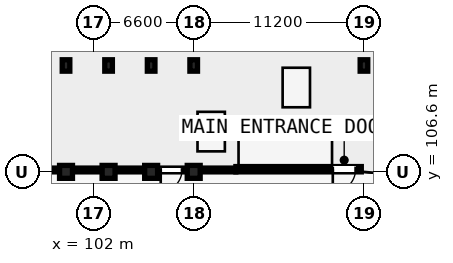
"""IFC4 building model, lengths in metres.
Left out: names, types, materials, properties, quantities, classifications, styles, units other than length and angle.
Written with IfcOpenShell. Run it as: python <this file> out.ifc"""

import sys

from ifc_helpers import new_model, si_unit, direction, frame, frame_2d, origin, origin_2d, place, context, subcontext, project, spatial, rectangle, extrude, element, fill, save


model = new_model("IFC4")
c1 = context("Model", 3, precision=1e-05, world=origin(), true_north=direction((0.0, 1.0)))
c2 = subcontext(c1, "Body", "Model", "MODEL_VIEW")
j1 = project(units=[si_unit("LENGTHUNIT", "METRE"), si_unit("PLANEANGLEUNIT", "RADIAN")], contexts=[c1])
p1 = place(None, origin())
s1 = spatial("IfcSite", under=j1, at=p1, CompositionType="ELEMENT")
p2 = place(p1, origin())
s2 = spatial("IfcBuilding", under=s1, at=p2, CompositionType="ELEMENT")
p3 = place(p2, origin())
s3 = spatial("IfcBuildingStorey", under=s2, at=p3, CompositionType="ELEMENT", Elevation=0.0)
p4 = place(p3, frame((119.625, 106.775, 0.0), z_axis=(0.0, 0.0, 1.0), x_axis=(-1.0, 0.0, 0.0)))
e1 = element("IfcWall", 1, at=p4, inside=s3, PredefinedType="SHEAR", context=c2, shape_type="SweptSolid", body=[
    extrude(rectangle(XDim=8.25, YDim=0.35, at=frame_2d((4.125, 0.0))), origin(), (0.0, 0.0, 1.0), 4.15),
])
p5 = place(p4, frame((0.375, 0.0, 0.0)))
e2 = element("IfcOpeningElement", 2, at=p5, cuts=e1, PredefinedType="OPENING", context=c2, shape_type="SweptSolid", body=[
    extrude(rectangle(XDim=1.5, YDim=2.15, at=frame_2d((0.75, 1.075))), frame((0.0, 0.185, 0.0), z_axis=(0.0, -1.0, 0.0), x_axis=(1.0, 0.0, 0.0)), (0.0, 0.0, 1.0), 0.37),
])
p6 = place(p3, frame((119.45, 110.225, 0.0), z_axis=(0.0, 0.0, 1.0), x_axis=(-1.0, 0.0, 0.0)))
e3 = element("IfcWall", 3, at=p6, inside=s3, PredefinedType="SHEAR", context=c2, shape_type="SweptSolid", body=[
    extrude(rectangle(XDim=7.9, YDim=0.35, at=frame_2d((3.95, 0.0))), origin(), (0.0, 0.0, 1.0), 4.15),
])
p7 = place(p6, frame((0.28, 0.0, 0.0)))
e4 = element("IfcOpeningElement", 4, at=p7, cuts=e3, PredefinedType="OPENING", context=c2, shape_type="SweptSolid", body=[
    extrude(rectangle(XDim=1.24, YDim=2.15, at=frame_2d((0.62, 1.075))), frame((0.0, 0.185, 0.0), z_axis=(0.0, -1.0, 0.0), x_axis=(1.0, 0.0, 0.0)), (0.0, 0.0, 1.0), 0.37),
])
for number, where, z_axis, x_axis in (
    (5, (119.625, 106.95, 0.0), (0.0, 0.0, 1.0), (0.0, 1.0, 0.0)),
    (6, (111.375, 106.95, 0.0), (0.0, 0.0, 1.0), (0.0, 1.0, 0.0)),
):
    element("IfcWall", number, at=place(p3, frame(where, z_axis=z_axis, x_axis=x_axis)), inside=s3, PredefinedType="SHEAR", context=c2, shape_type="SweptSolid", body=[
        extrude(rectangle(XDim=3.6, YDim=0.35, at=frame_2d((1.8, 0.0))), origin(), (0.0, 0.0, 1.0), 4.15),
    ])
p8 = place(p3, frame((119.8, 113.6, 0.0), z_axis=(0.0, 0.0, 1.0), x_axis=(1.0, 0.0, 0.0)))
e7 = element("IfcColumn", 7, at=p8, inside=s3, PredefinedType="COLUMN", context=c2, shape_type="SweptSolid", body=[
    extrude(rectangle(XDim=0.5, YDim=0.75, at=origin_2d()), origin(), (0.0, 0.0, 1.0), 4.15),
])
p9 = place(p3, frame((108.6, 106.6, 0.0), z_axis=(0.0, 0.0, 1.0), x_axis=(1.0, 0.0, 0.0)))
e8 = element("IfcColumn", 8, at=p9, inside=s3, PredefinedType="COLUMN", context=c2, shape_type="SweptSolid", body=[
    extrude(rectangle(XDim=0.85, YDim=0.85, at=origin_2d()), origin(), (0.0, 0.0, 1.0), 4.15),
])
p10 = place(p3, frame((108.6, 113.6, 0.0), z_axis=(0.0, 0.0, 1.0), x_axis=(1.0, 0.0, 0.0)))
e9 = element("IfcColumn", 9, at=p10, inside=s3, PredefinedType="COLUMN", context=c2, shape_type="SweptSolid", body=[
    extrude(rectangle(XDim=0.5, YDim=0.75, at=origin_2d()), origin(), (0.0, 0.0, 1.0), 4.15),
])
p11 = place(p3, frame((105.8, 106.6, 0.0), z_axis=(0.0, 0.0, 1.0), x_axis=(1.0, 0.0, 0.0)))
e10 = element("IfcColumn", 10, at=p11, inside=s3, PredefinedType="COLUMN", context=c2, shape_type="SweptSolid", body=[
    extrude(rectangle(XDim=0.85, YDim=0.85, at=origin_2d()), origin(), (0.0, 0.0, 1.0), 4.15),
])
p12 = place(p3, frame((105.8, 113.6, 0.0), z_axis=(0.0, 0.0, 1.0), x_axis=(1.0, 0.0, 0.0)))
e11 = element("IfcColumn", 11, at=p12, inside=s3, PredefinedType="COLUMN", context=c2, shape_type="SweptSolid", body=[
    extrude(rectangle(XDim=0.5, YDim=0.75, at=origin_2d()), origin(), (0.0, 0.0, 1.0), 4.15),
])
p13 = place(p3, frame((103.0, 106.6, 0.0), z_axis=(0.0, 0.0, 1.0), x_axis=(1.0, 0.0, 0.0)))
e12 = element("IfcColumn", 12, at=p13, inside=s3, PredefinedType="COLUMN", context=c2, shape_type="SweptSolid", body=[
    extrude(rectangle(XDim=0.85, YDim=0.85, at=origin_2d()), origin(), (0.0, 0.0, 1.0), 4.15),
])
p14 = place(p3, frame((103.0, 113.6, 0.0), z_axis=(0.0, 0.0, 1.0), x_axis=(1.0, 0.0, 0.0)))
e13 = element("IfcColumn", 13, at=p14, inside=s3, PredefinedType="COLUMN", context=c2, shape_type="SweptSolid", body=[
    extrude(rectangle(XDim=0.5, YDim=0.75, at=origin_2d()), origin(), (0.0, 0.0, 1.0), 4.15),
])
p15 = place(p3, frame((100.2, 106.6, 0.0), z_axis=(0.0, 0.0, 1.0), x_axis=(1.0, 0.0, 0.0)))
e14 = element("IfcColumn", 14, at=p15, inside=s3, PredefinedType="COLUMN", context=c2, shape_type="SweptSolid", body=[
    extrude(rectangle(XDim=0.85, YDim=0.85, at=origin_2d()), origin(), (0.0, 0.0, 1.0), 4.15),
])
p16 = place(p3, frame((100.2, 113.6, 0.0), z_axis=(0.0, 0.0, 1.0), x_axis=(1.0, 0.0, 0.0)))
e15 = element("IfcColumn", 15, at=p16, inside=s3, PredefinedType="COLUMN", context=c2, shape_type="SweptSolid", body=[
    extrude(rectangle(XDim=0.5, YDim=0.75, at=origin_2d()), origin(), (0.0, 0.0, 1.0), 4.15),
])
p17 = place(p3, frame((110.75, 107.95, 0.0), z_axis=(0.0, 0.0, 1.0), x_axis=(0.0, 1.0, 0.0)))
e16 = element("IfcWall", 16, at=p17, inside=s3, PredefinedType="STANDARD", context=c2, shape_type="SweptSolid", body=[
    extrude(rectangle(XDim=2.6, YDim=0.2, at=frame_2d((1.3, 0.0))), origin(), (0.0, 0.0, 1.0), 4.15),
])
p18 = place(p3, frame((108.75, 107.95, 0.0), z_axis=(0.0, 0.0, 1.0), x_axis=(0.0, 1.0, 0.0)))
e17 = element("IfcWall", 17, at=p18, inside=s3, PredefinedType="STANDARD", context=c2, shape_type="SweptSolid", body=[
    extrude(rectangle(XDim=2.6, YDim=0.2, at=frame_2d((1.3, 0.0))), origin(), (0.0, 0.0, 1.0), 3.492),
])
p19 = place(p3, frame((110.65, 107.85, 0.0), z_axis=(0.0, 0.0, 1.0), x_axis=(-1.0, 0.0, 0.0)))
e18 = element("IfcWall", 18, at=p19, inside=s3, PredefinedType="STANDARD", context=c2, shape_type="SweptSolid", body=[
    extrude(rectangle(XDim=1.8, YDim=0.2, at=frame_2d((0.9, 0.0))), origin(), (0.0, 0.0, 1.0), 4.15),
])
p20 = place(p3, frame((110.65, 110.65, 0.0), z_axis=(0.0, 0.0, 1.0), x_axis=(-1.0, 0.0, 0.0)))
e19 = element("IfcWall", 19, at=p20, inside=s3, PredefinedType="STANDARD", context=c2, shape_type="SweptSolid", body=[
    extrude(rectangle(XDim=1.8, YDim=0.2, at=frame_2d((0.9, 0.0))), origin(), (0.0, 0.0, 1.0), 4.15),
])
p21 = place(p20, frame((0.39, 0.0, 0.0)))
e20 = element("IfcOpeningElement", 20, at=p21, cuts=e19, PredefinedType="OPENING", context=c2, shape_type="SweptSolid", body=[
    extrude(rectangle(XDim=1.02, YDim=2.15, at=frame_2d((0.51, 1.075))), frame((0.0, 0.11, 0.0), z_axis=(0.0, -1.0, 0.0), x_axis=(1.0, 0.0, 0.0)), (0.0, 0.0, 1.0), 0.22),
])
p22 = place(p3, frame((116.35, 110.75, 0.0), z_axis=(0.0, 0.0, 1.0), x_axis=(-1.0, 0.0, 0.0)))
e21 = element("IfcWall", 21, at=p22, inside=s3, PredefinedType="STANDARD", context=c2, shape_type="SweptSolid", body=[
    extrude(rectangle(XDim=2.0, YDim=0.2, at=frame_2d((1.0, 0.0))), origin(), (0.0, 0.0, 1.0), 4.15),
])
p23 = place(p3, frame((116.35, 113.55, 0.0), z_axis=(0.0, 0.0, 1.0), x_axis=(-1.0, 0.0, 0.0)))
e22 = element("IfcWall", 22, at=p23, inside=s3, PredefinedType="STANDARD", context=c2, shape_type="SweptSolid", body=[
    extrude(rectangle(XDim=2.0, YDim=0.2, at=frame_2d((1.0, 0.0))), origin(), (0.0, 0.0, 1.0), 3.492),
])
p24 = place(p3, frame((116.35, 110.85, 0.0), z_axis=(0.0, 0.0, 1.0), x_axis=(0.0, 1.0, 0.0)))
e23 = element("IfcWall", 23, at=p24, inside=s3, PredefinedType="STANDARD", context=c2, shape_type="SweptSolid", body=[
    extrude(rectangle(XDim=2.6, YDim=0.2, at=frame_2d((1.3, 0.0))), origin(), (0.0, 0.0, 1.0), 3.492),
])
p25 = place(p3, frame((114.35, 110.85, 0.0), z_axis=(0.0, 0.0, 1.0), x_axis=(0.0, 1.0, 0.0)))
e24 = element("IfcWall", 24, at=p25, inside=s3, PredefinedType="STANDARD", context=c2, shape_type="SweptSolid", body=[
    extrude(rectangle(XDim=2.6, YDim=0.2, at=frame_2d((1.3, 0.0))), origin(), (0.0, 0.0, 1.0), 3.492),
])
p26 = place(p25, frame((0.79, 0.0, 0.0)))
e25 = element("IfcOpeningElement", 25, at=p26, cuts=e24, PredefinedType="OPENING", context=c2, shape_type="SweptSolid", body=[
    extrude(rectangle(XDim=1.02, YDim=2.15, at=frame_2d((0.51, 1.075))), frame((0.0, 0.11, 0.0), z_axis=(0.0, -1.0, 0.0), x_axis=(1.0, 0.0, 0.0)), (0.0, 0.0, 1.0), 0.22),
])
p27 = place(p3, frame((114.25, 113.6, 0.0), z_axis=(0.0, 0.0, 1.0), x_axis=(-1.0, 0.0, 0.0)))
e26 = element("IfcWall", 26, at=p27, inside=s3, PredefinedType="STANDARD", context=c2, shape_type="SweptSolid", body=[
    extrude(rectangle(XDim=5.6, YDim=0.2, at=frame_2d((2.8, 0.0))), origin(), (0.0, 0.0, 1.0), 3.492),
])
p28 = place(p27, frame((1.91, 0.0, 0.0)))
e27 = element("IfcOpeningElement", 27, at=p28, cuts=e26, PredefinedType="OPENING", context=c2, shape_type="SweptSolid", body=[
    extrude(rectangle(XDim=1.22, YDim=2.15, at=frame_2d((0.61, 1.075))), frame((0.0, 0.11, 0.0), z_axis=(0.0, -1.0, 0.0), x_axis=(1.0, 0.0, 0.0)), (0.0, 0.0, 1.0), 0.22),
])
p29 = place(p3, frame((108.6, 113.6, 0.0), z_axis=(0.0, 0.0, 1.0), x_axis=(-1.0, 0.0, 0.0)))
e28 = element("IfcWall", 28, at=p29, inside=s3, PredefinedType="STANDARD", context=c2, shape_type="SweptSolid", body=[
    extrude(rectangle(XDim=2.8, YDim=0.2, at=frame_2d((1.4, 0.0))), origin(), (0.0, 0.0, 1.0), 3.492),
])
p30 = place(p29, frame((0.9, 0.0, 0.0)))
e29 = element("IfcOpeningElement", 29, at=p30, cuts=e28, PredefinedType="OPENING", context=c2, shape_type="SweptSolid", body=[
    extrude(rectangle(XDim=1.0, YDim=2.15, at=frame_2d((0.5, 1.075))), frame((0.0, 0.11, 0.0), z_axis=(0.0, -1.0, 0.0), x_axis=(1.0, 0.0, 0.0)), (0.0, 0.0, 1.0), 0.22),
])
p31 = place(p3, frame((105.8, 113.6, 0.0), z_axis=(0.0, 0.0, 1.0), x_axis=(-1.0, 0.0, 0.0)))
e30 = element("IfcWall", 30, at=p31, inside=s3, PredefinedType="STANDARD", context=c2, shape_type="SweptSolid", body=[
    extrude(rectangle(XDim=2.8, YDim=0.2, at=frame_2d((1.4, 0.0))), origin(), (0.0, 0.0, 1.0), 3.492),
])
p32 = place(p3, frame((103.0, 113.6, 0.0), z_axis=(0.0, 0.0, 1.0), x_axis=(-1.0, 0.0, 0.0)))
e31 = element("IfcWall", 31, at=p32, inside=s3, PredefinedType="STANDARD", context=c2, shape_type="SweptSolid", body=[
    extrude(rectangle(XDim=2.8, YDim=0.2, at=frame_2d((1.4, 0.0))), origin(), (0.0, 0.0, 1.0), 3.492),
])
p33 = place(p32, frame((0.9, 0.0, 0.0)))
e32 = element("IfcOpeningElement", 32, at=p33, cuts=e31, PredefinedType="OPENING", context=c2, shape_type="SweptSolid", body=[
    extrude(rectangle(XDim=1.0, YDim=2.15, at=frame_2d((0.5, 1.075))), frame((0.0, 0.11, 0.0), z_axis=(0.0, -1.0, 0.0), x_axis=(1.0, 0.0, 0.0)), (0.0, 0.0, 1.0), 0.22),
])
p34 = place(p3, frame((100.2, 113.6, 0.0), z_axis=(0.0, 0.0, 1.0), x_axis=(-1.0, 0.0, 0.0)))
e33 = element("IfcWall", 33, at=p34, inside=s3, PredefinedType="STANDARD", context=c2, shape_type="SweptSolid", body=[
    extrude(rectangle(XDim=2.8, YDim=0.2, at=frame_2d((1.4, 0.0))), origin(), (0.0, 0.0, 1.0), 3.492),
])
p35 = place(p3, frame((105.8, 106.8, 0.0), z_axis=(0.0, 0.0, 1.0), x_axis=(0.0, 1.0, 0.0)))
e34 = element("IfcWall", 34, at=p35, inside=s3, PredefinedType="PARTITIONING", context=c2, shape_type="SweptSolid", body=[
    extrude(rectangle(XDim=6.75, YDim=0.15, at=frame_2d((3.375, 0.0))), origin(), (0.0, 0.0, 1.0), 3.492),
])
p36 = place(p35, frame((2.925, 0.0, 0.0)))
e35 = element("IfcOpeningElement", 35, at=p36, cuts=e34, PredefinedType="OPENING", context=c2, shape_type="SweptSolid", body=[
    extrude(rectangle(XDim=0.9, YDim=2.1, at=frame_2d((0.45, 1.05))), frame((0.0, 0.085, 0.0), z_axis=(0.0, -1.0, 0.0), x_axis=(1.0, 0.0, 0.0)), (0.0, 0.0, 1.0), 0.17),
])
p37 = place(p3, frame((103.0, 106.8, 0.0), z_axis=(0.0, 0.0, 1.0), x_axis=(0.0, 1.0, 0.0)))
e36 = element("IfcWall", 36, at=p37, inside=s3, PredefinedType="STANDARD", context=c2, shape_type="SweptSolid", body=[
    extrude(rectangle(XDim=6.75, YDim=0.22, at=frame_2d((3.375, 0.0))), origin(), (0.0, 0.0, 1.0), 3.492),
])
p38 = place(p3, frame((100.2, 106.8, 0.0), z_axis=(0.0, 0.0, 1.0), x_axis=(0.0, 1.0, 0.0)))
e37 = element("IfcWall", 37, at=p38, inside=s3, PredefinedType="PARTITIONING", context=c2, shape_type="SweptSolid", body=[
    extrude(rectangle(XDim=6.75, YDim=0.15, at=frame_2d((3.375, 0.0))), origin(), (0.0, 0.0, 1.0), 3.492),
])
p39 = place(p38, frame((2.925, 0.0, 0.0)))
e38 = element("IfcOpeningElement", 38, at=p39, cuts=e37, PredefinedType="OPENING", context=c2, shape_type="SweptSolid", body=[
    extrude(rectangle(XDim=0.9, YDim=2.1, at=frame_2d((0.45, 1.05))), frame((0.0, 0.085, 0.0), z_axis=(0.0, -1.0, 0.0), x_axis=(1.0, 0.0, 0.0)), (0.0, 0.0, 1.0), 0.17),
])
p40 = place(p3, frame((119.8, 113.6, 0.0), z_axis=(0.0, 0.0, 1.0), x_axis=(0.996191949488, -0.087187153726, 0.0)))
e39 = element("IfcWall", 39, at=p40, inside=s3, PredefinedType="STANDARD", context=c2, shape_type="SweptSolid", body=[
    extrude(rectangle(XDim=4.497, YDim=0.2, at=frame_2d((2.249, 0.0))), origin(), (0.0, 0.0, 1.0), 3.492),
])
p41 = place(p40, frame((1.729, 0.0, 0.0)))
e40 = element("IfcOpeningElement", 40, at=p41, cuts=e39, PredefinedType="OPENING", context=c2, shape_type="SweptSolid", body=[
    extrude(rectangle(XDim=1.04, YDim=2.15, at=frame_2d((0.52, 1.075))), frame((0.0, 0.11, 0.0), z_axis=(0.0, -1.0, 0.0), x_axis=(1.0, 0.0, 0.0)), (0.0, 0.0, 1.0), 0.22),
])
p42 = place(p3, frame((119.8, 110.35, 0.0), z_axis=(0.0, 0.0, 1.0), x_axis=(0.0, 1.0, 0.0)))
e41 = element("IfcWall", 41, at=p42, inside=s3, PredefinedType="STANDARD", context=c2, shape_type="SweptSolid", body=[
    extrude(rectangle(XDim=3.2, YDim=0.22, at=frame_2d((1.6, 0.0))), origin(), (0.0, 0.0, 1.0), 3.492),
])
p43 = place(p3, frame((111.372, 106.725, 0.0), z_axis=(0.0, 0.0, 1.0), x_axis=(-1.0, 0.0, 0.0)))
e42 = element("IfcWall", 42, at=p43, inside=s3, PredefinedType="STANDARD", context=c2, shape_type="SweptSolid", body=[
    extrude(rectangle(XDim=2.422, YDim=0.25, at=frame_2d((1.211, 0.0))), origin(), (0.0, 0.0, 1.0), 3.692),
])
p44 = place(p43, frame((0.822, 0.0, 0.88)))
e43 = element("IfcOpeningElement", 43, at=p44, cuts=e42, PredefinedType="OPENING", context=c2, shape_type="SweptSolid", body=[
    extrude(rectangle(XDim=1.2, YDim=1.5, at=frame_2d((0.6, 0.75))), frame((0.0, 0.135, 0.0), z_axis=(0.0, -1.0, 0.0), x_axis=(1.0, 0.0, 0.0)), (0.0, 0.0, 1.0), 0.27),
])
p45 = place(p3, frame((108.18, 106.725, 0.0), z_axis=(0.0, 0.0, 1.0), x_axis=(-1.0, 0.0, 0.0)))
e44 = element("IfcWall", 44, at=p45, inside=s3, PredefinedType="STANDARD", context=c2, shape_type="SweptSolid", body=[
    extrude(rectangle(XDim=1.96, YDim=0.25, at=frame_2d((0.98, 0.0))), origin(), (0.0, 0.0, 1.0), 3.692),
])
p46 = place(p45, frame((0.35, 0.0, 0.0)))
e45 = element("IfcOpeningElement", 45, at=p46, cuts=e44, PredefinedType="OPENING", context=c2, shape_type="SweptSolid", body=[
    extrude(rectangle(XDim=1.4, YDim=2.15, at=frame_2d((0.7, 1.075))), frame((0.0, 0.135, 0.0), z_axis=(0.0, -1.0, 0.0), x_axis=(1.0, 0.0, 0.0)), (0.0, 0.0, 1.0), 0.27),
])
p47 = place(p3, frame((105.38, 106.725, 0.0), z_axis=(0.0, 0.0, 1.0), x_axis=(-1.0, 0.0, 0.0)))
e46 = element("IfcWall", 46, at=p47, inside=s3, PredefinedType="STANDARD", context=c2, shape_type="SweptSolid", body=[
    extrude(rectangle(XDim=1.96, YDim=0.25, at=frame_2d((0.98, 0.0))), origin(), (0.0, 0.0, 1.0), 3.692),
])
p48 = place(p47, frame((0.38, 0.0, 0.88)))
e47 = element("IfcOpeningElement", 47, at=p48, cuts=e46, PredefinedType="OPENING", context=c2, shape_type="SweptSolid", body=[
    extrude(rectangle(XDim=1.2, YDim=1.5, at=frame_2d((0.6, 0.75))), frame((0.0, 0.135, 0.0), z_axis=(0.0, -1.0, 0.0), x_axis=(1.0, 0.0, 0.0)), (0.0, 0.0, 1.0), 0.27),
])
p49 = place(p3, frame((102.58, 106.725, 0.0), z_axis=(0.0, 0.0, 1.0), x_axis=(-1.0, 0.0, 0.0)))
e48 = element("IfcWall", 48, at=p49, inside=s3, PredefinedType="STANDARD", context=c2, shape_type="SweptSolid", body=[
    extrude(rectangle(XDim=1.96, YDim=0.25, at=frame_2d((0.98, 0.0))), origin(), (0.0, 0.0, 1.0), 3.692),
])
p50 = place(p49, frame((0.38, 0.0, 0.88)))
e49 = element("IfcOpeningElement", 49, at=p50, cuts=e48, PredefinedType="OPENING", context=c2, shape_type="SweptSolid", body=[
    extrude(rectangle(XDim=1.2, YDim=1.5, at=frame_2d((0.6, 0.75))), frame((0.0, 0.135, 0.0), z_axis=(0.0, -1.0, 0.0), x_axis=(1.0, 0.0, 0.0)), (0.0, 0.0, 1.0), 0.27),
])
p51 = place(p3, frame((99.78, 106.725, 0.0), z_axis=(0.0, 0.0, 1.0), x_axis=(-1.0, 0.0, 0.0)))
e50 = element("IfcWall", 50, at=p51, inside=s3, PredefinedType="STANDARD", context=c2, shape_type="SweptSolid", body=[
    extrude(rectangle(XDim=1.96, YDim=0.25, at=frame_2d((0.98, 0.0))), origin(), (0.0, 0.0, 1.0), 3.692),
])
p52 = place(p51, frame((0.38, 0.0, 0.88)))
e51 = element("IfcOpeningElement", 51, at=p52, cuts=e50, PredefinedType="OPENING", context=c2, shape_type="SweptSolid", body=[
    extrude(rectangle(XDim=1.2, YDim=1.5, at=frame_2d((0.6, 0.75))), frame((0.0, 0.135, 0.0), z_axis=(0.0, -1.0, 0.0), x_axis=(1.0, 0.0, 0.0)), (0.0, 0.0, 1.0), 0.27),
])
p53 = place(p44, origin())
e52 = element("IfcWindow", 52, at=p53, inside=s3, PartitioningType="SINGLE_PANEL", PredefinedType="WINDOW", context=c2, shape_type="SweptSolid", body=[
    extrude(rectangle(XDim=1.2, YDim=1.5, at=frame_2d((0.6, 0.75))), frame((0.0, 0.03, 0.0), z_axis=(0.0, -1.0, 0.0), x_axis=(1.0, 0.0, 0.0)), (0.0, 0.0, 1.0), 0.06),
])
fill(e43, e52)
p54 = place(p48, origin())
e53 = element("IfcWindow", 53, at=p54, inside=s3, PartitioningType="SINGLE_PANEL", PredefinedType="WINDOW", context=c2, shape_type="SweptSolid", body=[
    extrude(rectangle(XDim=1.2, YDim=1.5, at=frame_2d((0.6, 0.75))), frame((0.0, 0.03, 0.0), z_axis=(0.0, -1.0, 0.0), x_axis=(1.0, 0.0, 0.0)), (0.0, 0.0, 1.0), 0.06),
])
fill(e47, e53)
p55 = place(p50, origin())
e54 = element("IfcWindow", 54, at=p55, inside=s3, PartitioningType="SINGLE_PANEL", PredefinedType="WINDOW", context=c2, shape_type="SweptSolid", body=[
    extrude(rectangle(XDim=1.2, YDim=1.5, at=frame_2d((0.6, 0.75))), frame((0.0, 0.03, 0.0), z_axis=(0.0, -1.0, 0.0), x_axis=(1.0, 0.0, 0.0)), (0.0, 0.0, 1.0), 0.06),
])
fill(e49, e54)
p56 = place(p52, origin())
e55 = element("IfcWindow", 55, at=p56, inside=s3, PartitioningType="SINGLE_PANEL", PredefinedType="WINDOW", context=c2, shape_type="SweptSolid", body=[
    extrude(rectangle(XDim=1.2, YDim=1.5, at=frame_2d((0.6, 0.75))), frame((0.0, 0.03, 0.0), z_axis=(0.0, -1.0, 0.0), x_axis=(1.0, 0.0, 0.0)), (0.0, 0.0, 1.0), 0.06),
])
fill(e51, e55)
p57 = place(p7, frame((1.24, 0.0, 0.0), z_axis=(0.0, 0.0, 1.0), x_axis=(-1.0, 0.0, 0.0)))
e56 = element("IfcDoor", 56, at=p57, inside=s3, OperationType="SINGLE_SWING_RIGHT", PredefinedType="DOOR", context=c2, shape_type="SweptSolid", body=[
    extrude(rectangle(XDim=1.24, YDim=2.15, at=frame_2d((0.62, 1.075))), frame((0.0, 0.025, 0.0), z_axis=(0.0, -1.0, 0.0), x_axis=(1.0, 0.0, 0.0)), (0.0, 0.0, 1.0), 0.05),
])
fill(e4, e56)
p58 = place(p5, origin())
e57 = element("IfcDoor", 57, at=p58, inside=s3, OperationType="SINGLE_SWING_RIGHT", PredefinedType="DOOR", context=c2, shape_type="SweptSolid", body=[
    extrude(rectangle(XDim=1.5, YDim=2.15, at=frame_2d((0.75, 1.075))), frame((0.0, 0.025, 0.0), z_axis=(0.0, -1.0, 0.0), x_axis=(1.0, 0.0, 0.0)), (0.0, 0.0, 1.0), 0.05),
])
fill(e2, e57)
p59 = place(p21, origin())
e58 = element("IfcDoor", 58, at=p59, inside=s3, OperationType="SLIDING_TO_RIGHT", PredefinedType="DOOR", context=c2, shape_type="SweptSolid", body=[
    extrude(rectangle(XDim=1.02, YDim=2.15, at=frame_2d((0.51, 1.075))), frame((0.0, 0.025, 0.0), z_axis=(0.0, -1.0, 0.0), x_axis=(1.0, 0.0, 0.0)), (0.0, 0.0, 1.0), 0.05),
])
fill(e20, e58)
p60 = place(p26, origin())
e59 = element("IfcDoor", 59, at=p60, inside=s3, OperationType="SLIDING_TO_RIGHT", PredefinedType="DOOR", context=c2, shape_type="SweptSolid", body=[
    extrude(rectangle(XDim=1.02, YDim=2.15, at=frame_2d((0.51, 1.075))), frame((0.0, 0.025, 0.0), z_axis=(0.0, -1.0, 0.0), x_axis=(1.0, 0.0, 0.0)), (0.0, 0.0, 1.0), 0.05),
])
fill(e25, e59)
p61 = place(p28, frame((1.22, 0.0, 0.0), z_axis=(0.0, 0.0, 1.0), x_axis=(-1.0, 0.0, 0.0)))
e60 = element("IfcDoor", 60, at=p61, inside=s3, OperationType="SINGLE_SWING_RIGHT", PredefinedType="DOOR", context=c2, shape_type="SweptSolid", body=[
    extrude(rectangle(XDim=1.22, YDim=2.15, at=frame_2d((0.61, 1.075))), frame((0.0, 0.025, 0.0), z_axis=(0.0, -1.0, 0.0), x_axis=(1.0, 0.0, 0.0)), (0.0, 0.0, 1.0), 0.05),
])
fill(e27, e60)
p62 = place(p30, frame((1.0, 0.0, 0.0), z_axis=(0.0, 0.0, 1.0), x_axis=(-1.0, 0.0, 0.0)))
e61 = element("IfcDoor", 61, at=p62, inside=s3, OperationType="SINGLE_SWING_RIGHT", PredefinedType="DOOR", context=c2, shape_type="SweptSolid", body=[
    extrude(rectangle(XDim=1.0, YDim=2.15, at=frame_2d((0.5, 1.075))), frame((0.0, 0.025, 0.0), z_axis=(0.0, -1.0, 0.0), x_axis=(1.0, 0.0, 0.0)), (0.0, 0.0, 1.0), 0.05),
])
fill(e29, e61)
p63 = place(p33, frame((1.0, 0.0, 0.0), z_axis=(0.0, 0.0, 1.0), x_axis=(-1.0, 0.0, 0.0)))
e62 = element("IfcDoor", 62, at=p63, inside=s3, OperationType="SINGLE_SWING_RIGHT", PredefinedType="DOOR", context=c2, shape_type="SweptSolid", body=[
    extrude(rectangle(XDim=1.0, YDim=2.15, at=frame_2d((0.5, 1.075))), frame((0.0, 0.025, 0.0), z_axis=(0.0, -1.0, 0.0), x_axis=(1.0, 0.0, 0.0)), (0.0, 0.0, 1.0), 0.05),
])
fill(e32, e62)
p64 = place(p36, origin())
e63 = element("IfcDoor", 63, at=p64, inside=s3, OperationType="SINGLE_SWING_LEFT", PredefinedType="DOOR", context=c2, shape_type="SweptSolid", body=[
    extrude(rectangle(XDim=0.9, YDim=2.1, at=frame_2d((0.45, 1.05))), frame((0.0, 0.025, 0.0), z_axis=(0.0, -1.0, 0.0), x_axis=(1.0, 0.0, 0.0)), (0.0, 0.0, 1.0), 0.05),
])
fill(e35, e63)
p65 = place(p39, frame((0.9, 0.0, 0.0), z_axis=(0.0, 0.0, 1.0), x_axis=(-1.0, 0.0, 0.0)))
e64 = element("IfcDoor", 64, at=p65, inside=s3, OperationType="SINGLE_SWING_RIGHT", PredefinedType="DOOR", context=c2, shape_type="SweptSolid", body=[
    extrude(rectangle(XDim=0.9, YDim=2.1, at=frame_2d((0.45, 1.05))), frame((0.0, 0.025, 0.0), z_axis=(0.0, -1.0, 0.0), x_axis=(1.0, 0.0, 0.0)), (0.0, 0.0, 1.0), 0.05),
])
fill(e38, e64)
p66 = place(p46, origin())
e65 = element("IfcDoor", 65, at=p66, inside=s3, OperationType="SINGLE_SWING_RIGHT", PredefinedType="DOOR", context=c2, shape_type="SweptSolid", body=[
    extrude(rectangle(XDim=1.4, YDim=2.15, at=frame_2d((0.7, 1.075))), frame((0.0, 0.025, 0.0), z_axis=(0.0, -1.0, 0.0), x_axis=(1.0, 0.0, 0.0)), (0.0, 0.0, 1.0), 0.05),
])
fill(e45, e65)
save(model, sys.argv[1])
